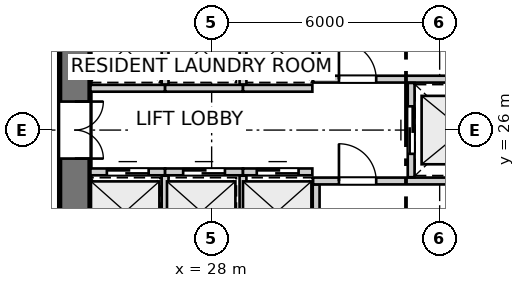
"""IFC4 building model, lengths in metres.
Left out: names, types, materials, properties, quantities, classifications, styles, units other than length and angle.
Written with IfcOpenShell. Run it as: python <this file> out.ifc"""

import sys

from ifc_helpers import new_model, si_unit, direction, frame, frame_2d, origin, place, context, subcontext, project, spatial, rectangle, extrude, source, transform, mapped, element, fill, save


model = new_model("IFC4")
c1 = context("Model", 3, precision=1e-05, world=origin(), true_north=direction((0.0, 1.0)))
c2 = subcontext(c1, "Body", "Model", "MODEL_VIEW")
j1 = project(units=[si_unit("LENGTHUNIT", "METRE"), si_unit("PLANEANGLEUNIT", "RADIAN")], contexts=[c1])
p1 = place(None, origin())
s1 = spatial("IfcSite", under=j1, at=p1, CompositionType="ELEMENT")
p2 = place(p1, origin())
s2 = spatial("IfcBuilding", under=s1, at=p2, CompositionType="ELEMENT")
p3 = place(p2, frame((0.0, 0.0, 33.4)))
s3 = spatial("IfcBuildingStorey", under=s2, at=p3, CompositionType="ELEMENT", Elevation=33.4)
p4 = place(p3, frame((24.4, 33.8, 0.0), z_axis=(0.0, 0.0, 1.0), x_axis=(0.0, -1.0, 0.0)))
e1 = element("IfcWall", 1, at=p4, inside=s3, PredefinedType="SHEAR", context=c2, shape_type="SweptSolid", body=[
    extrude(rectangle(XDim=15.6, YDim=0.8, at=frame_2d((7.8, 0.0))), origin(), (0.0, 0.0, 1.0), 2.94),
])
p5 = place(p4, frame((7.05, 0.0, 0.0)))
e2 = element("IfcOpeningElement", 2, at=p5, cuts=e1, PredefinedType="OPENING", context=c2, shape_type="SweptSolid", body=[
    extrude(rectangle(XDim=1.5, YDim=2.15, at=frame_2d((0.75, 1.075))), frame((0.0, 0.41, 0.0), z_axis=(0.0, -1.0, 0.0), x_axis=(1.0, 0.0, 0.0)), (0.0, 0.0, 1.0), 0.82),
])
p6 = place(p4, frame((3.52, 0.0, 0.0)))
e3 = element("IfcOpeningElement", 3, at=p6, cuts=e1, PredefinedType="OPENING", context=c2, shape_type="SweptSolid", body=[
    extrude(rectangle(XDim=0.86, YDim=2.05, at=frame_2d((0.43, 1.025))), frame((0.0, 0.41, 0.0), z_axis=(0.0, -1.0, 0.0), x_axis=(1.0, 0.0, 0.0)), (0.0, 0.0, 1.0), 0.82),
])
p7 = place(p4, frame((11.22, 0.0, 0.0)))
e4 = element("IfcOpeningElement", 4, at=p7, cuts=e1, PredefinedType="OPENING", context=c2, shape_type="SweptSolid", body=[
    extrude(rectangle(XDim=0.86, YDim=2.05, at=frame_2d((0.43, 1.025))), frame((0.0, 0.41, 0.0), z_axis=(0.0, -1.0, 0.0), x_axis=(1.0, 0.0, 0.0)), (0.0, 0.0, 1.0), 0.82),
])
p8 = place(p3, frame((30.75, 21.46, 0.0), z_axis=(0.0, 0.0, 1.0), x_axis=(0.0, 1.0, 0.0)))
e5 = element("IfcWall", 5, at=p8, inside=s3, PredefinedType="PARTITIONING", context=c2, shape_type="SweptSolid", body=[
    extrude(rectangle(XDim=3.11, YDim=0.18, at=frame_2d((1.555, 0.0))), origin(), (0.0, 0.0, 1.0), 2.94),
])
p9 = place(p8, frame((0.26, 0.0, 0.0)))
e6 = element("IfcOpeningElement", 6, at=p9, cuts=e5, PredefinedType="OPENING", context=c2, shape_type="SweptSolid", body=[
    extrude(rectangle(XDim=0.86, YDim=2.05, at=frame_2d((0.43, 1.025))), frame((0.0, 0.1, 0.0), z_axis=(0.0, -1.0, 0.0), x_axis=(1.0, 0.0, 0.0)), (0.0, 0.0, 1.0), 0.2),
])
p10 = place(p3, frame((30.67, 24.66, 0.0), z_axis=(0.0, 0.0, 1.0), x_axis=(1.0, 0.0, 0.0)))
e7 = element("IfcWall", 7, at=p10, inside=s3, PredefinedType="PARTITIONING", context=c2, shape_type="SweptSolid", body=[
    extrude(rectangle(XDim=5.22, YDim=0.18, at=frame_2d((2.61, 0.0))), origin(), (0.0, 0.0, 1.0), 2.94),
])
p11 = place(p10, frame((0.68, 0.0, 0.0)))
e8 = element("IfcOpeningElement", 8, at=p11, cuts=e7, PredefinedType="OPENING", context=c2, shape_type="SweptSolid", body=[
    extrude(rectangle(XDim=0.98, YDim=2.15, at=frame_2d((0.49, 1.075))), frame((0.0, 0.1, 0.0), z_axis=(0.0, -1.0, 0.0), x_axis=(1.0, 0.0, 0.0)), (0.0, 0.0, 1.0), 0.2),
])
p12 = place(p3, frame((30.75, 27.43, 0.0), z_axis=(0.0, 0.0, 1.0), x_axis=(0.0, 1.0, 0.0)))
e9 = element("IfcWall", 9, at=p12, inside=s3, PredefinedType="PARTITIONING", context=c2, shape_type="SweptSolid", body=[
    extrude(rectangle(XDim=3.11, YDim=0.18, at=frame_2d((1.555, 0.0))), origin(), (0.0, 0.0, 1.0), 2.94),
])
p13 = place(p12, frame((1.98, 0.0, 0.0)))
e10 = element("IfcOpeningElement", 10, at=p13, cuts=e9, PredefinedType="OPENING", context=c2, shape_type="SweptSolid", body=[
    extrude(rectangle(XDim=0.86, YDim=2.05, at=frame_2d((0.43, 1.025))), frame((0.0, 0.1, 0.0), z_axis=(0.0, -1.0, 0.0), x_axis=(1.0, 0.0, 0.0)), (0.0, 0.0, 1.0), 0.2),
])
p14 = place(p3, frame((30.67, 27.34, 0.0), z_axis=(0.0, 0.0, 1.0), x_axis=(1.0, 0.0, 0.0)))
e11 = element("IfcWall", 11, at=p14, inside=s3, PredefinedType="PARTITIONING", context=c2, shape_type="SweptSolid", body=[
    extrude(rectangle(XDim=5.22, YDim=0.18, at=frame_2d((2.61, 0.0))), origin(), (0.0, 0.0, 1.0), 2.94),
])
p15 = place(p14, frame((0.68, 0.0, 0.0)))
e12 = element("IfcOpeningElement", 12, at=p15, cuts=e11, PredefinedType="OPENING", context=c2, shape_type="SweptSolid", body=[
    extrude(rectangle(XDim=0.98, YDim=2.15, at=frame_2d((0.49, 1.075))), frame((0.0, 0.1, 0.0), z_axis=(0.0, -1.0, 0.0), x_axis=(1.0, 0.0, 0.0)), (0.0, 0.0, 1.0), 0.2),
])
p16 = place(p3, frame((33.25, 24.76, 0.0), z_axis=(0.0, 0.0, 1.0), x_axis=(0.0, 1.0, 0.0)))
e13 = element("IfcWall", 13, at=p16, inside=s3, PredefinedType="PARTITIONING", context=c2, shape_type="SweptSolid", body=[
    extrude(rectangle(XDim=2.48, YDim=0.18, at=frame_2d((1.24, 0.0))), origin(), (0.0, 0.0, 1.0), 2.94),
])
p17 = place(p16, frame((0.615, 0.0, 0.0)))
e14 = element("IfcOpeningElement", 14, at=p17, cuts=e13, PredefinedType="OPENING", context=c2, shape_type="SweptSolid", body=[
    extrude(rectangle(XDim=1.25, YDim=2.15, at=frame_2d((0.625, 1.075))), frame((0.0, 0.1, 0.0), z_axis=(0.0, -1.0, 0.0), x_axis=(1.0, 0.0, 0.0)), (0.0, 0.0, 1.0), 0.2),
])
p18 = place(p3, frame((24.81, 24.9, 0.0), z_axis=(0.0, 0.0, 1.0), x_axis=(1.0, 0.0, 0.0)))
e15 = element("IfcWall", 15, at=p18, inside=s3, PredefinedType="PARTITIONING", context=c2, shape_type="SweptSolid", body=[
    extrude(rectangle(XDim=1.965, YDim=0.18, at=frame_2d((0.982, 0.0))), origin(), (0.0, 0.0, 1.0), 2.94),
])
p19 = place(p18, frame((0.433, 0.0, 0.0)))
e16 = element("IfcOpeningElement", 16, at=p19, cuts=e15, PredefinedType="OPENING", context=c2, shape_type="SweptSolid", body=[
    extrude(rectangle(XDim=1.1, YDim=2.15, at=frame_2d((0.55, 1.075))), frame((0.0, 0.1, 0.0), z_axis=(0.0, -1.0, 0.0), x_axis=(1.0, 0.0, 0.0)), (0.0, 0.0, 1.0), 0.2),
])
p20 = place(p3, frame((26.775, 24.9, 0.0), z_axis=(0.0, 0.0, 1.0), x_axis=(1.0, 0.0, 0.0)))
e17 = element("IfcWall", 17, at=p20, inside=s3, PredefinedType="PARTITIONING", context=c2, shape_type="SweptSolid", body=[
    extrude(rectangle(XDim=2.05, YDim=0.18, at=frame_2d((1.025, 0.0))), origin(), (0.0, 0.0, 1.0), 2.94),
])
p21 = place(p20, frame((0.475, 0.0, 0.0)))
e18 = element("IfcOpeningElement", 18, at=p21, cuts=e17, PredefinedType="OPENING", context=c2, shape_type="SweptSolid", body=[
    extrude(rectangle(XDim=1.1, YDim=2.15, at=frame_2d((0.55, 1.075))), frame((0.0, 0.1, 0.0), z_axis=(0.0, -1.0, 0.0), x_axis=(1.0, 0.0, 0.0)), (0.0, 0.0, 1.0), 0.2),
])
p22 = place(p3, frame((26.775, 23.02, 0.0), z_axis=(0.0, 0.0, 1.0), x_axis=(0.0, 1.0, 0.0)))
e19 = element("IfcWall", 19, at=p22, inside=s3, PredefinedType="PARTITIONING", context=c2, shape_type="SweptSolid", body=[
    extrude(rectangle(XDim=1.78, YDim=0.18, at=frame_2d((0.89, 0.0))), origin(), (0.0, 0.0, 1.0), 2.94),
])
p23 = place(p3, frame((28.825, 24.9, 0.0), z_axis=(0.0, 0.0, 1.0), x_axis=(1.0, 0.0, 0.0)))
e20 = element("IfcWall", 20, at=p23, inside=s3, PredefinedType="PARTITIONING", context=c2, shape_type="SweptSolid", body=[
    extrude(rectangle(XDim=1.825, YDim=0.18, at=frame_2d((0.913, 0.0))), origin(), (0.0, 0.0, 1.0), 2.94),
])
p24 = place(p23, frame((0.363, 0.0, 0.0)))
e21 = element("IfcOpeningElement", 21, at=p24, cuts=e20, PredefinedType="OPENING", context=c2, shape_type="SweptSolid", body=[
    extrude(rectangle(XDim=1.1, YDim=2.15, at=frame_2d((0.55, 1.075))), frame((0.0, 0.1, 0.0), z_axis=(0.0, -1.0, 0.0), x_axis=(1.0, 0.0, 0.0)), (0.0, 0.0, 1.0), 0.2),
])
p25 = place(p3, frame((28.825, 23.02, 0.0), z_axis=(0.0, 0.0, 1.0), x_axis=(0.0, 1.0, 0.0)))
e22 = element("IfcWall", 22, at=p25, inside=s3, PredefinedType="PARTITIONING", context=c2, shape_type="SweptSolid", body=[
    extrude(rectangle(XDim=1.78, YDim=0.18, at=frame_2d((0.89, 0.0))), origin(), (0.0, 0.0, 1.0), 2.94),
])
p26 = place(p3, frame((24.81, 27.1, 0.0), z_axis=(0.0, 0.0, 1.0), x_axis=(1.0, 0.0, 0.0)))
e23 = element("IfcWall", 23, at=p26, inside=s3, PredefinedType="PARTITIONING", context=c2, shape_type="SweptSolid", body=[
    extrude(rectangle(XDim=1.965, YDim=0.18, at=frame_2d((0.982, 0.0))), origin(), (0.0, 0.0, 1.0), 2.94),
])
p27 = place(p3, frame((26.775, 27.1, 0.0), z_axis=(0.0, 0.0, 1.0), x_axis=(1.0, 0.0, 0.0)))
e24 = element("IfcWall", 24, at=p27, inside=s3, PredefinedType="PARTITIONING", context=c2, shape_type="SweptSolid", body=[
    extrude(rectangle(XDim=2.05, YDim=0.18, at=frame_2d((1.025, 0.0))), origin(), (0.0, 0.0, 1.0), 2.94),
])
p28 = place(p3, frame((26.775, 27.2, 0.0), z_axis=(0.0, 0.0, 1.0), x_axis=(0.0, 1.0, 0.0)))
e25 = element("IfcWall", 25, at=p28, inside=s3, PredefinedType="PARTITIONING", context=c2, shape_type="SweptSolid", body=[
    extrude(rectangle(XDim=1.78, YDim=0.18, at=frame_2d((0.89, 0.0))), origin(), (0.0, 0.0, 1.0), 2.94),
])
p29 = place(p3, frame((28.825, 27.1, 0.0), z_axis=(0.0, 0.0, 1.0), x_axis=(1.0, 0.0, 0.0)))
e26 = element("IfcWall", 26, at=p29, inside=s3, PredefinedType="PARTITIONING", context=c2, shape_type="SweptSolid", body=[
    extrude(rectangle(XDim=1.825, YDim=0.18, at=frame_2d((0.913, 0.0))), origin(), (0.0, 0.0, 1.0), 2.94),
])
p30 = place(p3, frame((28.825, 27.2, 0.0), z_axis=(0.0, 0.0, 1.0), x_axis=(0.0, 1.0, 0.0)))
e27 = element("IfcWall", 27, at=p30, inside=s3, PredefinedType="PARTITIONING", context=c2, shape_type="SweptSolid", body=[
    extrude(rectangle(XDim=1.78, YDim=0.18, at=frame_2d((0.89, 0.0))), origin(), (0.0, 0.0, 1.0), 2.94),
])
m1 = source(origin(), c2, "Body", "SweptSolid", [
    extrude(rectangle(XDim=1.5, YDim=2.15, at=frame_2d((0.75, 1.075))), frame((0.0, 0.025, 0.0), z_axis=(0.0, -1.0, 0.0), x_axis=(1.0, 0.0, 0.0)), (0.0, 0.0, 1.0), 0.05),
])
p31 = place(p5, origin())
e28 = element("IfcDoor", 28, at=p31, inside=s3, OperationType="DOUBLE_DOOR_SINGLE_SWING", PredefinedType="DOOR", context=c2, shape_type="MappedRepresentation", body=[
    mapped(m1, transform((0.0, 0.0, 0.0), x_axis=(1.0, 0.0, 0.0), y_axis=(0.0, 1.0, 0.0), z_axis=(0.0, 0.0, 1.0), scale=1.0)),
])
fill(e2, e28)
m2 = source(origin(), c2, "Body", "SweptSolid", [
    extrude(rectangle(XDim=0.98, YDim=2.15, at=frame_2d((0.49, 1.075))), frame((0.0, 0.025, 0.0), z_axis=(0.0, -1.0, 0.0), x_axis=(1.0, 0.0, 0.0)), (0.0, 0.0, 1.0), 0.05),
])
p32 = place(p11, origin())
e29 = element("IfcDoor", 29, at=p32, inside=s3, OperationType="SINGLE_SWING_LEFT", PredefinedType="DOOR", context=c2, shape_type="MappedRepresentation", body=[
    mapped(m2, transform((0.0, 0.0, 0.0), x_axis=(1.0, 0.0, 0.0), y_axis=(0.0, 1.0, 0.0), z_axis=(0.0, 0.0, 1.0), scale=1.0)),
])
fill(e8, e29)
p33 = place(p15, origin())
e30 = element("IfcDoor", 30, at=p33, inside=s3, OperationType="SINGLE_SWING_LEFT", PredefinedType="DOOR", context=c2, shape_type="MappedRepresentation", body=[
    mapped(m2, transform((0.0, 0.0, 0.0), x_axis=(1.0, 0.0, 0.0), y_axis=(0.0, 1.0, 0.0), z_axis=(0.0, 0.0, 1.0), scale=1.0)),
])
fill(e12, e30)
m3 = source(origin(), c2, "Body", "SweptSolid", [
    extrude(rectangle(XDim=1.25, YDim=2.15, at=frame_2d((0.625, 1.075))), frame((0.0, 0.025, 0.0), z_axis=(0.0, -1.0, 0.0), x_axis=(1.0, 0.0, 0.0)), (0.0, 0.0, 1.0), 0.05),
])
p34 = place(p17, origin())
e31 = element("IfcDoor", 31, at=p34, inside=s3, OperationType="DOUBLE_DOOR_SLIDING", PredefinedType="DOOR", context=c2, shape_type="MappedRepresentation", body=[
    mapped(m3, transform((0.0, 0.0, 0.0), x_axis=(1.0, 0.0, 0.0), y_axis=(0.0, 1.0, 0.0), z_axis=(0.0, 0.0, 1.0), scale=1.0)),
])
fill(e14, e31)
m4 = source(origin(), c2, "Body", "SweptSolid", [
    extrude(rectangle(XDim=1.1, YDim=2.15, at=frame_2d((0.55, 1.075))), frame((0.0, 0.025, 0.0), z_axis=(0.0, -1.0, 0.0), x_axis=(1.0, 0.0, 0.0)), (0.0, 0.0, 1.0), 0.05),
])
p35 = place(p19, origin())
e32 = element("IfcDoor", 32, at=p35, inside=s3, OperationType="DOUBLE_DOOR_SLIDING", PredefinedType="DOOR", context=c2, shape_type="MappedRepresentation", body=[
    mapped(m4, transform((0.0, 0.0, 0.0), x_axis=(1.0, 0.0, 0.0), y_axis=(0.0, 1.0, 0.0), z_axis=(0.0, 0.0, 1.0), scale=1.0)),
])
fill(e16, e32)
p36 = place(p21, origin())
e33 = element("IfcDoor", 33, at=p36, inside=s3, OperationType="DOUBLE_DOOR_SLIDING", PredefinedType="DOOR", context=c2, shape_type="MappedRepresentation", body=[
    mapped(m4, transform((0.0, 0.0, 0.0), x_axis=(1.0, 0.0, 0.0), y_axis=(0.0, 1.0, 0.0), z_axis=(0.0, 0.0, 1.0), scale=1.0)),
])
fill(e18, e33)
p37 = place(p24, origin())
e34 = element("IfcDoor", 34, at=p37, inside=s3, OperationType="DOUBLE_DOOR_SLIDING", PredefinedType="DOOR", context=c2, shape_type="MappedRepresentation", body=[
    mapped(m4, transform((0.0, 0.0, 0.0), x_axis=(1.0, 0.0, 0.0), y_axis=(0.0, 1.0, 0.0), z_axis=(0.0, 0.0, 1.0), scale=1.0)),
])
fill(e21, e34)
save(model, sys.argv[1])
